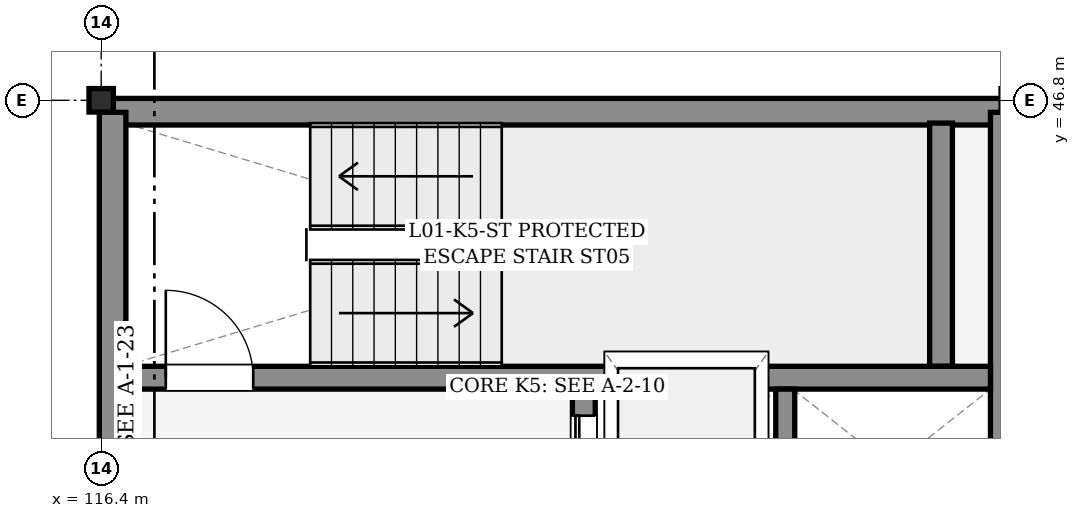
"""IFC4 building model, lengths in metres.
Left out: names, types, materials, properties, quantities, classifications, styles, units other than length and angle.
Written with IfcOpenShell. Run it as: python <this file> out.ifc"""

import sys

from ifc_helpers import new_model, si_unit, direction, frame, frame_2d, origin, origin_2d, place, context, subcontext, project, spatial, rectangle, i_section, extrude, element, fill, save


model = new_model("IFC4")
c1 = context("Model", 3, precision=1e-05, world=origin(), true_north=direction((0.0, 1.0)))
c2 = subcontext(c1, "Body", "Model", "MODEL_VIEW")
j1 = project(units=[si_unit("LENGTHUNIT", "METRE"), si_unit("PLANEANGLEUNIT", "RADIAN")], contexts=[c1])
p1 = place(None, origin())
s1 = spatial("IfcSite", under=j1, at=p1, CompositionType="ELEMENT")
p2 = place(p1, origin())
s2 = spatial("IfcBuilding", under=s1, at=p2, CompositionType="ELEMENT")
p3 = place(p2, frame((0.0, 0.0, 5.4)))
s3 = spatial("IfcBuildingStorey", under=s2, at=p3, CompositionType="ELEMENT", Elevation=5.4)
p4 = place(p3, frame((116.4, 46.8, 0.0), z_axis=(0.0, 0.0, 1.0), x_axis=(1.0, 0.0, 0.0)))
e1 = element("IfcColumn", 1, at=p4, inside=s3, PredefinedType="COLUMN", context=c2, shape_type="SweptSolid", body=[
    extrude(i_section(OverallWidth=0.309, OverallDepth=0.321, WebThickness=0.014, FlangeThickness=0.022, FilletRadius=0.015, at=origin_2d()), origin(), (0.0, 0.0, 1.0), 3.6),
])
p5 = place(p3, frame((116.552, 46.65, 0.0), z_axis=(0.0, 0.0, 1.0), x_axis=(1.0, 0.0, 0.0)))
e2 = element("IfcWall", 2, at=p5, inside=s3, PredefinedType="SHEAR", context=c2, shape_type="SweptSolid", body=[
    extrude(rectangle(XDim=11.695, YDim=0.35, at=frame_2d((5.848, 0.0))), origin(), (0.0, 0.0, 1.0), 3.38),
])
p6 = place(p3, frame((116.55, 38.559, 0.0), z_axis=(0.0, 0.0, 1.0), x_axis=(0.0, 1.0, 0.0)))
e3 = element("IfcWall", 3, at=p6, inside=s3, PredefinedType="SHEAR", context=c2, shape_type="SweptSolid", body=[
    extrude(rectangle(XDim=8.083, YDim=0.35, at=frame_2d((4.042, 0.0))), origin(), (0.0, 0.0, 1.0), 3.38),
])
p7 = place(p3, frame((128.25, 38.559, 0.0), z_axis=(0.0, 0.0, 1.0), x_axis=(0.0, 1.0, 0.0)))
e4 = element("IfcWall", 4, at=p7, inside=s3, PredefinedType="SHEAR", context=c2, shape_type="SweptSolid", body=[
    extrude(rectangle(XDim=8.083, YDim=0.3, at=frame_2d((4.042, 0.0))), origin(), (0.0, 0.0, 1.0), 3.38),
])
p8 = place(p3, frame((127.45, 43.3, 0.0), z_axis=(0.0, 0.0, 1.0), x_axis=(0.0, 1.0, 0.0)))
e5 = element("IfcWall", 5, at=p8, inside=s3, PredefinedType="SHEAR", context=c2, shape_type="SweptSolid", body=[
    extrude(rectangle(XDim=3.2, YDim=0.3, at=frame_2d((1.6, 0.0))), origin(), (0.0, 0.0, 1.0), 3.38),
])
p9 = place(p3, frame((116.7, 43.15, 0.0), z_axis=(0.0, 0.0, 1.0), x_axis=(1.0, 0.0, 0.0)))
e6 = element("IfcWall", 6, at=p9, inside=s3, PredefinedType="SHEAR", context=c2, shape_type="SweptSolid", body=[
    extrude(rectangle(XDim=11.4, YDim=0.3, at=frame_2d((5.7, 0.0))), origin(), (0.0, 0.0, 1.0), 3.38),
])
p10 = place(p9, frame((0.55, 0.0, 0.0)))
e7 = element("IfcOpeningElement", 7, at=p10, cuts=e6, PredefinedType="OPENING", context=c2, shape_type="SweptSolid", body=[
    extrude(rectangle(XDim=1.15, YDim=2.15, at=frame_2d((0.575, 1.075))), frame((0.0, 0.16, 0.0), z_axis=(0.0, -1.0, 0.0), x_axis=(1.0, 0.0, 0.0)), (0.0, 0.0, 1.0), 0.32),
])
p11 = place(p3, frame((122.75, 40.85, 0.0), z_axis=(0.0, 0.0, 1.0), x_axis=(0.0, 1.0, 0.0)))
e8 = element("IfcWall", 8, at=p11, inside=s3, PredefinedType="SHEAR", context=c2, shape_type="SweptSolid", body=[
    extrude(rectangle(XDim=2.15, YDim=0.3, at=frame_2d((1.075, 0.0))), origin(), (0.0, 0.0, 1.0), 3.38),
])
p12 = place(p11, frame((0.5, 0.0, 0.0)))
e9 = element("IfcOpeningElement", 9, at=p12, cuts=e8, PredefinedType="OPENING", context=c2, shape_type="SweptSolid", body=[
    extrude(rectangle(XDim=1.3, YDim=2.3, at=frame_2d((0.65, 1.15))), frame((0.0, 0.16, 0.0), z_axis=(0.0, -1.0, 0.0), x_axis=(1.0, 0.0, 0.0)), (0.0, 0.0, 1.0), 0.32),
])
p13 = place(p3, frame((125.4, 40.95, 0.0), z_axis=(0.0, 0.0, 1.0), x_axis=(0.0, 1.0, 0.0)))
e10 = element("IfcWall", 10, at=p13, inside=s3, PredefinedType="PARTITIONING", context=c2, shape_type="SweptSolid", body=[
    extrude(rectangle(XDim=2.05, YDim=0.25, at=frame_2d((1.025, 0.0))), origin(), (0.0, 0.0, 1.0), 2.525),
])
p14 = place(p10, origin())
e11 = element("IfcDoor", 11, at=p14, inside=s3, OperationType="SINGLE_SWING_LEFT", PredefinedType="DOOR", context=c2, shape_type="SweptSolid", body=[
    extrude(rectangle(XDim=1.15, YDim=2.15, at=frame_2d((0.575, 1.075))), frame((0.0, 0.025, 0.0), z_axis=(0.0, -1.0, 0.0), x_axis=(1.0, 0.0, 0.0)), (0.0, 0.0, 1.0), 0.05),
])
fill(e7, e11)
p15 = place(p12, origin())
e12 = element("IfcDoor", 12, at=p15, inside=s3, OperationType="SLIDING_TO_LEFT", PredefinedType="DOOR", context=c2, shape_type="SweptSolid", body=[
    extrude(rectangle(XDim=1.3, YDim=2.3, at=frame_2d((0.65, 1.15))), frame((0.0, 0.025, 0.0), z_axis=(0.0, -1.0, 0.0), x_axis=(1.0, 0.0, 0.0)), (0.0, 0.0, 1.0), 0.05),
])
fill(e9, e12)
save(model, sys.argv[1])
